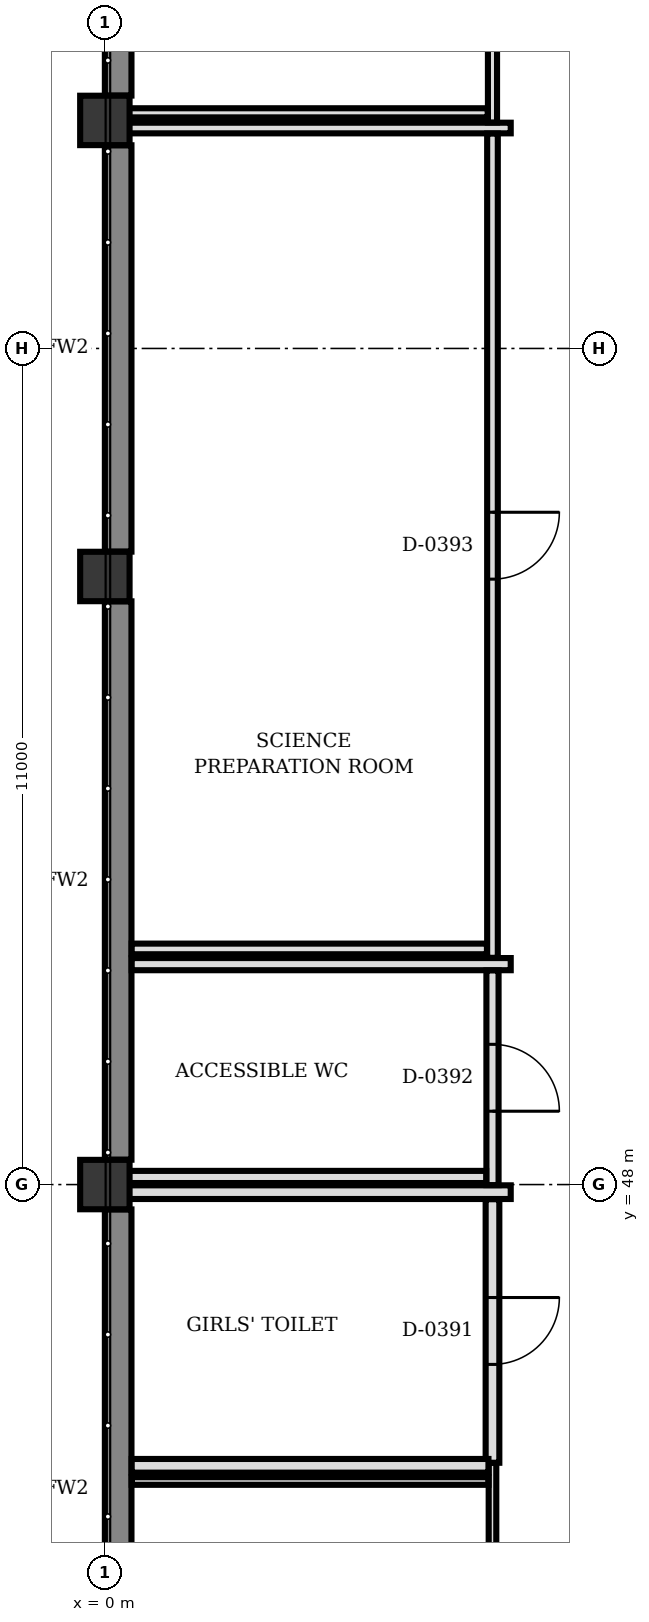
"""IFC4 building model, lengths in metres.
Left out: names, types, materials, properties, quantities, classifications, styles, units other than length and angle.
Written with IfcOpenShell. Run it as: python <this file> out.ifc"""

import sys

from ifc_helpers import new_model, si_unit, direction, frame, frame_2d, origin, origin_2d, place, context, subcontext, project, spatial, rectangle, extrude, element, fill, save


model = new_model("IFC4")
c1 = context("Model", 3, precision=1e-05, world=origin(), true_north=direction((0.0, 1.0)))
c2 = subcontext(c1, "Body", "Model", "MODEL_VIEW")
j1 = project(units=[si_unit("LENGTHUNIT", "METRE"), si_unit("PLANEANGLEUNIT", "RADIAN")], contexts=[c1])
p1 = place(None, origin())
s1 = spatial("IfcSite", under=j1, at=p1, CompositionType="ELEMENT")
p2 = place(p1, origin())
s2 = spatial("IfcBuilding", under=s1, at=p2, CompositionType="ELEMENT")
p3 = place(p2, frame((0.0, 0.0, 12.5)))
s3 = spatial("IfcBuildingStorey", under=s2, at=p3, CompositionType="ELEMENT", Elevation=12.5)
for number, where, z_axis, x_axis in (
    (1, (0.0, 48.0, 0.0), (0.0, 0.0, 1.0), (1.0, 0.0, 0.0)),
    (2, (0.0, 56.0, 0.0), (0.0, 0.0, 1.0), (1.0, 0.0, 0.0)),
    (3, (0.0, 62.0, 0.0), (0.0, 0.0, 1.0), (1.0, 0.0, 0.0)),
):
    element("IfcColumn", number, at=place(p3, frame(where, z_axis=z_axis, x_axis=x_axis)), inside=s3, PredefinedType="COLUMN", context=c2, shape_type="SweptSolid", body=[
        extrude(rectangle(XDim=0.65, YDim=0.65, at=origin_2d()), origin(), (0.0, 0.0, 1.0), 4.0),
    ])
for number, where, z_axis, x_axis in (
    (4, (0.175, 40.327, 0.0), (0.0, 0.0, 1.0), (0.0, 1.0, 0.0)),
    (5, (0.175, 48.327, 0.0), (0.0, 0.0, 1.0), (0.0, 1.0, 0.0)),
):
    element("IfcWall", number, at=place(p3, frame(where, z_axis=z_axis, x_axis=x_axis)), inside=s3, PredefinedType="SHEAR", context=c2, shape_type="SweptSolid", body=[
        extrude(rectangle(XDim=7.346, YDim=0.35, at=frame_2d((3.673, 0.0))), origin(), (0.0, 0.0, 1.0), 3.002),
    ])
for number, where, z_axis, x_axis in (
    (6, (0.175, 56.327, 0.0), (0.0, 0.0, 1.0), (0.0, 1.0, 0.0)),
    (7, (0.175, 62.327, 0.0), (0.0, 0.0, 1.0), (0.0, 1.0, 0.0)),
):
    element("IfcWall", number, at=place(p3, frame(where, z_axis=z_axis, x_axis=x_axis)), inside=s3, PredefinedType="SHEAR", context=c2, shape_type="SweptSolid", body=[
        extrude(rectangle(XDim=5.346, YDim=0.35, at=frame_2d((2.673, 0.0))), origin(), (0.0, 0.0, 1.0), 3.002),
    ])
p4 = place(p3, frame((5.1, 44.34, 0.0), z_axis=(0.0, 0.0, 1.0), x_axis=(0.0, -1.0, 0.0)))
e8 = element("IfcWall", 8, at=p4, inside=s3, PredefinedType="PARTITIONING", context=c2, shape_type="SweptSolid", body=[
    extrude(rectangle(XDim=4.207, YDim=0.1, at=frame_2d((2.104, 0.0))), origin(), (0.0, 0.0, 1.0), 3.7),
])
p5 = place(p4, frame((1.479, 0.0, 0.0)))
e9 = element("IfcOpeningElement", 9, at=p5, cuts=e8, PredefinedType="OPENING", context=c2, shape_type="SweptSolid", body=[
    extrude(rectangle(XDim=1.25, YDim=2.2, at=frame_2d((0.625, 1.1))), frame((0.0, 0.06, 0.0), z_axis=(0.0, -1.0, 0.0), x_axis=(1.0, 0.0, 0.0)), (0.0, 0.0, 1.0), 0.12),
])
p6 = place(p3, frame((0.353, 44.1, 0.0), z_axis=(0.0, 0.0, 1.0), x_axis=(1.0, 0.0, 0.0)))
e10 = element("IfcWall", 10, at=p6, inside=s3, PredefinedType="PARTITIONING", context=c2, shape_type="SweptSolid", body=[
    extrude(rectangle(XDim=4.694, YDim=0.1, at=frame_2d((2.347, 0.0))), origin(), (0.0, 0.0, 1.0), 3.7),
])
p7 = place(p3, frame((0.317, 47.9, 0.0), z_axis=(0.0, 0.0, 1.0), x_axis=(1.0, 0.0, 0.0)))
e11 = element("IfcWall", 11, at=p7, inside=s3, PredefinedType="PARTITIONING", context=c2, shape_type="SweptSolid", body=[
    extrude(rectangle(XDim=5.023, YDim=0.18, at=frame_2d((2.512, 0.0))), origin(), (0.0, 0.0, 1.0), 3.002),
])
p8 = place(p3, frame((5.1, 47.807, 0.0), z_axis=(0.0, 0.0, 1.0), x_axis=(0.0, -1.0, 0.0)))
e12 = element("IfcWall", 12, at=p8, inside=s3, PredefinedType="PARTITIONING", context=c2, shape_type="SweptSolid", body=[
    extrude(rectangle(XDim=3.467, YDim=0.18, at=frame_2d((1.733, 0.0))), origin(), (0.0, 0.0, 1.0), 3.002),
])
p9 = place(p8, frame((1.293, 0.0, 0.0)))
e13 = element("IfcOpeningElement", 13, at=p9, cuts=e12, PredefinedType="OPENING", context=c2, shape_type="SweptSolid", body=[
    extrude(rectangle(XDim=0.88, YDim=2.1, at=frame_2d((0.44, 1.05))), frame((0.0, 0.1, 0.0), z_axis=(0.0, -1.0, 0.0), x_axis=(1.0, 0.0, 0.0)), (0.0, 0.0, 1.0), 0.2),
])
p10 = place(p3, frame((5.047, 44.3, 0.0), z_axis=(0.0, 0.0, 1.0), x_axis=(-1.0, 0.0, 0.0)))
e14 = element("IfcWall", 14, at=p10, inside=s3, PredefinedType="PARTITIONING", context=c2, shape_type="SweptSolid", body=[
    extrude(rectangle(XDim=4.694, YDim=0.18, at=frame_2d((2.347, 0.0))), origin(), (0.0, 0.0, 1.0), 3.7),
])
p11 = place(p3, frame((0.353, 50.9, 0.0), z_axis=(0.0, 0.0, 1.0), x_axis=(1.0, 0.0, 0.0)))
e15 = element("IfcWall", 15, at=p11, inside=s3, PredefinedType="PARTITIONING", context=c2, shape_type="SweptSolid", body=[
    extrude(rectangle(XDim=4.987, YDim=0.16, at=frame_2d((2.494, 0.0))), origin(), (0.0, 0.0, 1.0), 3.7),
])
p12 = place(p3, frame((5.1, 50.817, 0.0), z_axis=(0.0, 0.0, 1.0), x_axis=(0.0, -1.0, 0.0)))
e16 = element("IfcWall", 16, at=p12, inside=s3, PredefinedType="PARTITIONING", context=c2, shape_type="SweptSolid", body=[
    extrude(rectangle(XDim=2.824, YDim=0.16, at=frame_2d((1.412, 0.0))), origin(), (0.0, 0.0, 1.0), 3.002),
])
p13 = place(p12, frame((0.972, 0.0, 0.0)))
e17 = element("IfcOpeningElement", 17, at=p13, cuts=e16, PredefinedType="OPENING", context=c2, shape_type="SweptSolid", body=[
    extrude(rectangle(XDim=0.88, YDim=2.1, at=frame_2d((0.44, 1.05))), frame((0.0, 0.09, 0.0), z_axis=(0.0, -1.0, 0.0), x_axis=(1.0, 0.0, 0.0)), (0.0, 0.0, 1.0), 0.18),
])
p14 = place(p3, frame((5.017, 48.1, 0.0), z_axis=(0.0, 0.0, 1.0), x_axis=(-1.0, 0.0, 0.0)))
e18 = element("IfcWall", 18, at=p14, inside=s3, PredefinedType="PARTITIONING", context=c2, shape_type="SweptSolid", body=[
    extrude(rectangle(XDim=4.7, YDim=0.16, at=frame_2d((2.35, 0.0))), origin(), (0.0, 0.0, 1.0), 3.002),
])
p15 = place(p3, frame((0.317, 61.9, 0.0), z_axis=(0.0, 0.0, 1.0), x_axis=(1.0, 0.0, 0.0)))
e19 = element("IfcWall", 19, at=p15, inside=s3, PredefinedType="PARTITIONING", context=c2, shape_type="SweptSolid", body=[
    extrude(rectangle(XDim=5.023, YDim=0.14, at=frame_2d((2.512, 0.0))), origin(), (0.0, 0.0, 1.0), 3.002),
])
p16 = place(p3, frame((5.1, 61.827, 0.0), z_axis=(0.0, 0.0, 1.0), x_axis=(0.0, -1.0, 0.0)))
e20 = element("IfcWall", 20, at=p16, inside=s3, PredefinedType="PARTITIONING", context=c2, shape_type="SweptSolid", body=[
    extrude(rectangle(XDim=10.844, YDim=0.14, at=frame_2d((5.422, 0.0))), origin(), (0.0, 0.0, 1.0), 3.002),
])
p17 = place(p16, frame((4.982, 0.0, 0.0)))
e21 = element("IfcOpeningElement", 21, at=p17, cuts=e20, PredefinedType="OPENING", context=c2, shape_type="SweptSolid", body=[
    extrude(rectangle(XDim=0.88, YDim=2.1, at=frame_2d((0.44, 1.05))), frame((0.0, 0.08, 0.0), z_axis=(0.0, -1.0, 0.0), x_axis=(1.0, 0.0, 0.0)), (0.0, 0.0, 1.0), 0.16),
])
p18 = place(p3, frame((5.027, 51.1, 0.0), z_axis=(0.0, 0.0, 1.0), x_axis=(-1.0, 0.0, 0.0)))
e22 = element("IfcWall", 22, at=p18, inside=s3, PredefinedType="PARTITIONING", context=c2, shape_type="SweptSolid", body=[
    extrude(rectangle(XDim=4.674, YDim=0.14, at=frame_2d((2.337, 0.0))), origin(), (0.0, 0.0, 1.0), 3.7),
])
p19 = place(p3, frame((5.1, 75.867, 0.0), z_axis=(0.0, 0.0, 1.0), x_axis=(0.0, -1.0, 0.0)))
e23 = element("IfcWall", 23, at=p19, inside=s3, PredefinedType="PARTITIONING", context=c2, shape_type="SweptSolid", body=[
    extrude(rectangle(XDim=13.894, YDim=0.12, at=frame_2d((6.947, 0.0))), origin(), (0.0, 0.0, 1.0), 3.002),
])
p20 = place(p19, frame((6.472, 0.0, 0.0)))
e24 = element("IfcOpeningElement", 24, at=p20, cuts=e23, PredefinedType="OPENING", context=c2, shape_type="SweptSolid", body=[
    extrude(rectangle(XDim=0.95, YDim=2.28, at=frame_2d((0.475, 1.14))), frame((0.0, 0.07, 0.0), z_axis=(0.0, -1.0, 0.0), x_axis=(1.0, 0.0, 0.0)), (0.0, 0.0, 1.0), 0.14),
])
p21 = place(p3, frame((5.037, 62.1, 0.0), z_axis=(0.0, 0.0, 1.0), x_axis=(-1.0, 0.0, 0.0)))
e25 = element("IfcWall", 25, at=p21, inside=s3, PredefinedType="PARTITIONING", context=c2, shape_type="SweptSolid", body=[
    extrude(rectangle(XDim=4.72, YDim=0.12, at=frame_2d((2.36, 0.0))), origin(), (0.0, 0.0, 1.0), 3.002),
])
p22 = place(p9, origin())
e26 = element("IfcDoor", 26, at=p22, inside=s3, OperationType="SINGLE_SWING_LEFT", PredefinedType="DOOR", context=c2, shape_type="SweptSolid", body=[
    extrude(rectangle(XDim=0.88, YDim=2.1, at=frame_2d((0.44, 1.05))), frame((0.0, 0.025, 0.0), z_axis=(0.0, -1.0, 0.0), x_axis=(1.0, 0.0, 0.0)), (0.0, 0.0, 1.0), 0.05),
])
fill(e13, e26)
p23 = place(p13, origin())
e27 = element("IfcDoor", 27, at=p23, inside=s3, OperationType="SINGLE_SWING_RIGHT", PredefinedType="DOOR", context=c2, shape_type="SweptSolid", body=[
    extrude(rectangle(XDim=0.88, YDim=2.1, at=frame_2d((0.44, 1.05))), frame((0.0, 0.025, 0.0), z_axis=(0.0, -1.0, 0.0), x_axis=(1.0, 0.0, 0.0)), (0.0, 0.0, 1.0), 0.05),
])
fill(e17, e27)
p24 = place(p17, origin())
e28 = element("IfcDoor", 28, at=p24, inside=s3, OperationType="SINGLE_SWING_LEFT", PredefinedType="DOOR", context=c2, shape_type="SweptSolid", body=[
    extrude(rectangle(XDim=0.88, YDim=2.1, at=frame_2d((0.44, 1.05))), frame((0.0, 0.025, 0.0), z_axis=(0.0, -1.0, 0.0), x_axis=(1.0, 0.0, 0.0)), (0.0, 0.0, 1.0), 0.05),
])
fill(e21, e28)
save(model, sys.argv[1])
